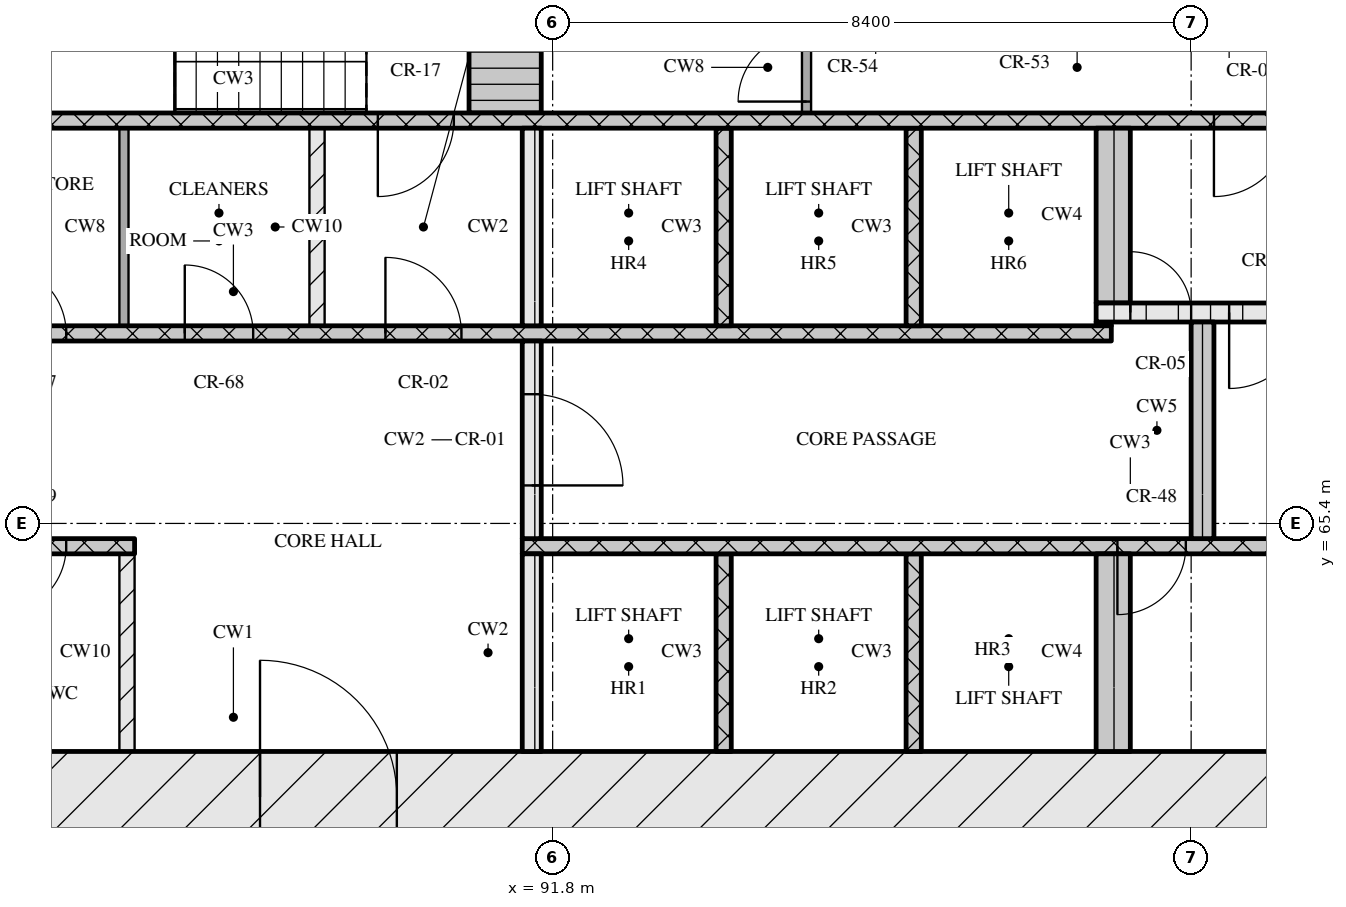
"""IFC4 building model, lengths in metres.
Left out: names, types, materials, properties, quantities, classifications, styles, units other than length and angle.
Written with IfcOpenShell. Run it as: python <this file> out.ifc"""

import sys

from ifc_helpers import new_model, si_unit, direction, frame, frame_2d, origin, place, context, subcontext, project, spatial, rectangle, extrude, element, fill, save


model = new_model("IFC4")
c1 = context("Model", 3, precision=1e-05, world=origin(), true_north=direction((0.0, 1.0)))
c2 = subcontext(c1, "Body", "Model", "MODEL_VIEW")
j1 = project(units=[si_unit("LENGTHUNIT", "METRE"), si_unit("PLANEANGLEUNIT", "RADIAN")], contexts=[c1])
p1 = place(None, origin())
s1 = spatial("IfcSite", under=j1, at=p1, CompositionType="ELEMENT")
p2 = place(p1, origin())
s2 = spatial("IfcBuilding", under=s1, at=p2, CompositionType="ELEMENT")
p3 = place(p2, frame((0.0, 0.0, 62.4)))
s3 = spatial("IfcBuildingStorey", under=s2, at=p3, CompositionType="ELEMENT", Elevation=62.4)
p4 = place(p3, frame((66.6, 61.8, 0.0), z_axis=(0.0, 0.0, 1.0), x_axis=(1.0, 0.0, 0.0)))
e1 = element("IfcWall", 1, at=p4, inside=s3, PredefinedType="SOLIDWALL", context=c2, shape_type="SweptSolid", body=[
    extrude(rectangle(XDim=42.0, YDim=1.2, at=frame_2d((21.0, 0.0))), origin(), (0.0, 0.0, 1.0), 3.32),
])
p5 = place(p4, frame((21.35, 0.0, 0.0)))
e2 = element("IfcOpeningElement", 2, at=p5, cuts=e1, PredefinedType="OPENING", context=c2, shape_type="SweptSolid", body=[
    extrude(rectangle(XDim=1.8, YDim=2.1, at=frame_2d((0.9, 1.05))), frame((0.0, 0.61, 0.0), z_axis=(0.0, -1.0, 0.0), x_axis=(1.0, 0.0, 0.0)), (0.0, 0.0, 1.0), 1.22),
])
p6 = place(p3, frame((86.2, 62.4, 0.0), z_axis=(0.0, 0.0, 1.0), x_axis=(0.0, 1.0, 0.0)))
e3 = element("IfcWall", 3, at=p6, inside=s3, PredefinedType="PARTITIONING", context=c2, shape_type="SweptSolid", body=[
    extrude(rectangle(XDim=2.6, YDim=0.2, at=frame_2d((1.3, 0.0))), origin(), (0.0, 0.0, 1.0), 3.32),
])
p7 = place(p3, frame((91.525, 62.4, 0.0), z_axis=(0.0, 0.0, 1.0), x_axis=(0.0, 1.0, 0.0)))
e4 = element("IfcWall", 4, at=p7, inside=s3, PredefinedType="SOLIDWALL", context=c2, shape_type="SweptSolid", body=[
    extrude(rectangle(XDim=2.6, YDim=0.25, at=frame_2d((1.3, 0.0))), origin(), (0.0, 0.0, 1.0), 3.32),
])
for number, where, z_axis, x_axis in (
    (5, (94.05, 62.4, 0.0), (0.0, 0.0, 1.0), (0.0, 1.0, 0.0)),
    (6, (96.55, 62.4, 0.0), (0.0, 0.0, 1.0), (0.0, 1.0, 0.0)),
):
    element("IfcWall", number, at=place(p3, frame(where, z_axis=z_axis, x_axis=x_axis)), inside=s3, PredefinedType="SOLIDWALL", context=c2, shape_type="SweptSolid", body=[
        extrude(rectangle(XDim=2.6, YDim=0.2, at=frame_2d((1.3, 0.0))), origin(), (0.0, 0.0, 1.0), 3.32),
    ])
p8 = place(p3, frame((99.175, 62.4, 0.0), z_axis=(0.0, 0.0, 1.0), x_axis=(0.0, 1.0, 0.0)))
e7 = element("IfcWall", 7, at=p8, inside=s3, PredefinedType="SOLIDWALL", context=c2, shape_type="SweptSolid", body=[
    extrude(rectangle(XDim=2.6, YDim=0.45, at=frame_2d((1.3, 0.0))), origin(), (0.0, 0.0, 1.0), 3.32),
])
p9 = place(p3, frame((67.8, 65.1, 0.0), z_axis=(0.0, 0.0, 1.0), x_axis=(1.0, 0.0, 0.0)))
e8 = element("IfcWall", 8, at=p9, inside=s3, PredefinedType="SOLIDWALL", context=c2, shape_type="SweptSolid", body=[
    extrude(rectangle(XDim=18.5, YDim=0.2, at=frame_2d((9.25, 0.0))), origin(), (0.0, 0.0, 1.0), 3.32),
])
p10 = place(p9, frame((7.27, 0.0, 0.0)))
e9 = element("IfcOpeningElement", 9, at=p10, cuts=e8, PredefinedType="OPENING", context=c2, shape_type="SweptSolid", body=[
    extrude(rectangle(XDim=0.9, YDim=2.1, at=frame_2d((0.45, 1.05))), frame((0.0, 0.11, 0.0), z_axis=(0.0, -1.0, 0.0), x_axis=(1.0, 0.0, 0.0)), (0.0, 0.0, 1.0), 0.22),
])
p11 = place(p9, frame((8.85, 0.0, 0.0)))
e10 = element("IfcOpeningElement", 10, at=p11, cuts=e8, PredefinedType="OPENING", context=c2, shape_type="SweptSolid", body=[
    extrude(rectangle(XDim=1.1, YDim=2.1, at=frame_2d((0.55, 1.05))), frame((0.0, 0.11, 0.0), z_axis=(0.0, -1.0, 0.0), x_axis=(1.0, 0.0, 0.0)), (0.0, 0.0, 1.0), 0.22),
])
p12 = place(p9, frame((11.35, 0.0, 0.0)))
e11 = element("IfcOpeningElement", 11, at=p12, cuts=e8, PredefinedType="OPENING", context=c2, shape_type="SweptSolid", body=[
    extrude(rectangle(XDim=1.1, YDim=2.1, at=frame_2d((0.55, 1.05))), frame((0.0, 0.11, 0.0), z_axis=(0.0, -1.0, 0.0), x_axis=(1.0, 0.0, 0.0)), (0.0, 0.0, 1.0), 0.22),
])
p13 = place(p9, frame((13.85, 0.0, 0.0)))
e12 = element("IfcOpeningElement", 12, at=p13, cuts=e8, PredefinedType="OPENING", context=c2, shape_type="SweptSolid", body=[
    extrude(rectangle(XDim=1.1, YDim=2.1, at=frame_2d((0.55, 1.05))), frame((0.0, 0.11, 0.0), z_axis=(0.0, -1.0, 0.0), x_axis=(1.0, 0.0, 0.0)), (0.0, 0.0, 1.0), 0.22),
])
p14 = place(p9, frame((16.7, 0.0, 0.0)))
e13 = element("IfcOpeningElement", 13, at=p14, cuts=e8, PredefinedType="OPENING", context=c2, shape_type="SweptSolid", body=[
    extrude(rectangle(XDim=0.9, YDim=2.1, at=frame_2d((0.45, 1.05))), frame((0.0, 0.11, 0.0), z_axis=(0.0, -1.0, 0.0), x_axis=(1.0, 0.0, 0.0)), (0.0, 0.0, 1.0), 0.22),
])
p15 = place(p3, frame((91.4, 65.1, 0.0), z_axis=(0.0, 0.0, 1.0), x_axis=(1.0, 0.0, 0.0)))
e14 = element("IfcWall", 14, at=p15, inside=s3, PredefinedType="SOLIDWALL", context=c2, shape_type="SweptSolid", body=[
    extrude(rectangle(XDim=16.0, YDim=0.2, at=frame_2d((8.0, 0.0))), origin(), (0.0, 0.0, 1.0), 3.32),
])
p16 = place(p15, frame((7.83, 0.0, 0.0)))
e15 = element("IfcOpeningElement", 15, at=p16, cuts=e14, PredefinedType="OPENING", context=c2, shape_type="SweptSolid", body=[
    extrude(rectangle(XDim=0.9, YDim=2.1, at=frame_2d((0.45, 1.05))), frame((0.0, 0.11, 0.0), z_axis=(0.0, -1.0, 0.0), x_axis=(1.0, 0.0, 0.0)), (0.0, 0.0, 1.0), 0.22),
])
p17 = place(p3, frame((91.525, 65.2, 0.0), z_axis=(0.0, 0.0, 1.0), x_axis=(0.0, 1.0, 0.0)))
e16 = element("IfcWall", 16, at=p17, inside=s3, PredefinedType="SOLIDWALL", context=c2, shape_type="SweptSolid", body=[
    extrude(rectangle(XDim=2.6, YDim=0.25, at=frame_2d((1.3, 0.0))), origin(), (0.0, 0.0, 1.0), 3.32),
])
p18 = place(p17, frame((0.7, 0.0, 0.0)))
e17 = element("IfcOpeningElement", 17, at=p18, cuts=e16, PredefinedType="OPENING", context=c2, shape_type="SweptSolid", body=[
    extrude(rectangle(XDim=1.2, YDim=2.1, at=frame_2d((0.6, 1.05))), frame((0.0, 0.135, 0.0), z_axis=(0.0, -1.0, 0.0), x_axis=(1.0, 0.0, 0.0)), (0.0, 0.0, 1.0), 0.27),
])
p19 = place(p3, frame((100.35, 65.2, 0.0), z_axis=(0.0, 0.0, 1.0), x_axis=(0.0, 1.0, 0.0)))
e18 = element("IfcWall", 18, at=p19, inside=s3, PredefinedType="SOLIDWALL", context=c2, shape_type="SweptSolid", body=[
    extrude(rectangle(XDim=2.85, YDim=0.3, at=frame_2d((1.425, 0.0))), origin(), (0.0, 0.0, 1.0), 3.32),
])
p20 = place(p3, frame((76.05, 67.9, 0.0), z_axis=(0.0, 0.0, 1.0), x_axis=(1.0, 0.0, 0.0)))
e19 = element("IfcWall", 19, at=p20, inside=s3, PredefinedType="SOLIDWALL", context=c2, shape_type="SweptSolid", body=[
    extrude(rectangle(XDim=23.1, YDim=0.2, at=frame_2d((11.55, 0.0))), origin(), (0.0, 0.0, 1.0), 3.32),
])
p21 = place(p20, frame((0.6, 0.0, 0.0)))
e20 = element("IfcOpeningElement", 20, at=p21, cuts=e19, PredefinedType="OPENING", context=c2, shape_type="SweptSolid", body=[
    extrude(rectangle(XDim=1.1, YDim=2.1, at=frame_2d((0.55, 1.05))), frame((0.0, 0.11, 0.0), z_axis=(0.0, -1.0, 0.0), x_axis=(1.0, 0.0, 0.0)), (0.0, 0.0, 1.0), 0.22),
])
p22 = place(p20, frame((3.1, 0.0, 0.0)))
e21 = element("IfcOpeningElement", 21, at=p22, cuts=e19, PredefinedType="OPENING", context=c2, shape_type="SweptSolid", body=[
    extrude(rectangle(XDim=1.1, YDim=2.1, at=frame_2d((0.55, 1.05))), frame((0.0, 0.11, 0.0), z_axis=(0.0, -1.0, 0.0), x_axis=(1.0, 0.0, 0.0)), (0.0, 0.0, 1.0), 0.22),
])
p23 = place(p20, frame((5.6, 0.0, 0.0)))
e22 = element("IfcOpeningElement", 22, at=p23, cuts=e19, PredefinedType="OPENING", context=c2, shape_type="SweptSolid", body=[
    extrude(rectangle(XDim=1.1, YDim=2.1, at=frame_2d((0.55, 1.05))), frame((0.0, 0.11, 0.0), z_axis=(0.0, -1.0, 0.0), x_axis=(1.0, 0.0, 0.0)), (0.0, 0.0, 1.0), 0.22),
])
p24 = place(p20, frame((8.45, 0.0, 0.0)))
e23 = element("IfcOpeningElement", 23, at=p24, cuts=e19, PredefinedType="OPENING", context=c2, shape_type="SweptSolid", body=[
    extrude(rectangle(XDim=0.9, YDim=2.1, at=frame_2d((0.45, 1.05))), frame((0.0, 0.11, 0.0), z_axis=(0.0, -1.0, 0.0), x_axis=(1.0, 0.0, 0.0)), (0.0, 0.0, 1.0), 0.22),
])
p25 = place(p20, frame((10.91, 0.0, 0.0)))
e24 = element("IfcOpeningElement", 24, at=p25, cuts=e19, PredefinedType="OPENING", context=c2, shape_type="SweptSolid", body=[
    extrude(rectangle(XDim=0.9, YDim=2.1, at=frame_2d((0.45, 1.05))), frame((0.0, 0.11, 0.0), z_axis=(0.0, -1.0, 0.0), x_axis=(1.0, 0.0, 0.0)), (0.0, 0.0, 1.0), 0.22),
])
p26 = place(p20, frame((13.55, 0.0, 0.0)))
e25 = element("IfcOpeningElement", 25, at=p26, cuts=e19, PredefinedType="OPENING", context=c2, shape_type="SweptSolid", body=[
    extrude(rectangle(XDim=1.0, YDim=2.1, at=frame_2d((0.5, 1.05))), frame((0.0, 0.11, 0.0), z_axis=(0.0, -1.0, 0.0), x_axis=(1.0, 0.0, 0.0)), (0.0, 0.0, 1.0), 0.22),
])
p27 = place(p3, frame((86.16, 68.0, 0.0), z_axis=(0.0, 0.0, 1.0), x_axis=(0.0, 1.0, 0.0)))
e26 = element("IfcWall", 26, at=p27, inside=s3, PredefinedType="PARTITIONING", context=c2, shape_type="SweptSolid", body=[
    extrude(rectangle(XDim=2.6, YDim=0.12, at=frame_2d((1.3, 0.0))), origin(), (0.0, 0.0, 1.0), 3.32),
])
p28 = place(p3, frame((88.7, 68.0, 0.0), z_axis=(0.0, 0.0, 1.0), x_axis=(0.0, 1.0, 0.0)))
e27 = element("IfcWall", 27, at=p28, inside=s3, PredefinedType="PARTITIONING", context=c2, shape_type="SweptSolid", body=[
    extrude(rectangle(XDim=2.6, YDim=0.2, at=frame_2d((1.3, 0.0))), origin(), (0.0, 0.0, 1.0), 3.32),
])
p29 = place(p3, frame((91.525, 68.0, 0.0), z_axis=(0.0, 0.0, 1.0), x_axis=(0.0, 1.0, 0.0)))
e28 = element("IfcWall", 28, at=p29, inside=s3, PredefinedType="SOLIDWALL", context=c2, shape_type="SweptSolid", body=[
    extrude(rectangle(XDim=2.6, YDim=0.25, at=frame_2d((1.3, 0.0))), origin(), (0.0, 0.0, 1.0), 3.32),
])
for number, where, z_axis, x_axis in (
    (29, (94.05, 68.0, 0.0), (0.0, 0.0, 1.0), (0.0, 1.0, 0.0)),
    (30, (96.55, 68.0, 0.0), (0.0, 0.0, 1.0), (0.0, 1.0, 0.0)),
):
    element("IfcWall", number, at=place(p3, frame(where, z_axis=z_axis, x_axis=x_axis)), inside=s3, PredefinedType="SOLIDWALL", context=c2, shape_type="SweptSolid", body=[
        extrude(rectangle(XDim=2.6, YDim=0.2, at=frame_2d((1.3, 0.0))), origin(), (0.0, 0.0, 1.0), 3.32),
    ])
p30 = place(p3, frame((98.95, 68.025, 0.0), z_axis=(0.0, 0.0, 1.0), x_axis=(1.0, 0.0, 0.0)))
e31 = element("IfcWall", 31, at=p30, inside=s3, PredefinedType="SOLIDWALL", context=c2, shape_type="SweptSolid", body=[
    extrude(rectangle(XDim=0.2, YDim=0.05, at=frame_2d((0.1, 0.0))), origin(), (0.0, 0.0, 1.0), 3.32),
])
p31 = place(p3, frame((98.95, 68.175, 0.0), z_axis=(0.0, 0.0, 1.0), x_axis=(1.0, 0.0, 0.0)))
e32 = element("IfcWall", 32, at=p31, inside=s3, PredefinedType="SOLIDWALL", context=c2, shape_type="SweptSolid", body=[
    extrude(rectangle(XDim=8.45, YDim=0.25, at=frame_2d((4.225, 0.0))), origin(), (0.0, 0.0, 1.0), 3.32),
])
p32 = place(p31, frame((0.45, 0.0, 0.0)))
e33 = element("IfcOpeningElement", 33, at=p32, cuts=e32, PredefinedType="OPENING", context=c2, shape_type="SweptSolid", body=[
    extrude(rectangle(XDim=0.8, YDim=2.1, at=frame_2d((0.4, 1.05))), frame((0.0, 0.135, 0.0), z_axis=(0.0, -1.0, 0.0), x_axis=(1.0, 0.0, 0.0)), (0.0, 0.0, 1.0), 0.27),
])
p33 = place(p31, frame((1.75, 0.0, 0.0)))
e34 = element("IfcOpeningElement", 34, at=p33, cuts=e32, PredefinedType="OPENING", context=c2, shape_type="SweptSolid", body=[
    extrude(rectangle(XDim=1.0, YDim=2.1, at=frame_2d((0.5, 1.05))), frame((0.0, 0.135, 0.0), z_axis=(0.0, -1.0, 0.0), x_axis=(1.0, 0.0, 0.0)), (0.0, 0.0, 1.0), 0.27),
])
p34 = place(p3, frame((99.175, 68.3, 0.0), z_axis=(0.0, 0.0, 1.0), x_axis=(0.0, 1.0, 0.0)))
e35 = element("IfcWall", 35, at=p34, inside=s3, PredefinedType="SOLIDWALL", context=c2, shape_type="SweptSolid", body=[
    extrude(rectangle(XDim=2.3, YDim=0.45, at=frame_2d((1.15, 0.0))), origin(), (0.0, 0.0, 1.0), 3.32),
])
p35 = place(p3, frame((67.8, 70.7, 0.0), z_axis=(0.0, 0.0, 1.0), x_axis=(1.0, 0.0, 0.0)))
e36 = element("IfcWall", 36, at=p35, inside=s3, PredefinedType="SOLIDWALL", context=c2, shape_type="SweptSolid", body=[
    extrude(rectangle(XDim=39.6, YDim=0.2, at=frame_2d((19.8, 0.0))), origin(), (0.0, 0.0, 1.0), 3.32),
])
p36 = place(p35, frame((0.65, 0.0, 0.0)))
e37 = element("IfcOpeningElement", 37, at=p36, cuts=e36, PredefinedType="OPENING", context=c2, shape_type="SweptSolid", body=[
    extrude(rectangle(XDim=1.1, YDim=2.1, at=frame_2d((0.55, 1.05))), frame((0.0, 0.11, 0.0), z_axis=(0.0, -1.0, 0.0), x_axis=(1.0, 0.0, 0.0)), (0.0, 0.0, 1.0), 0.22),
])
p37 = place(p35, frame((3.25, 0.0, 0.0)))
e38 = element("IfcOpeningElement", 38, at=p37, cuts=e36, PredefinedType="OPENING", context=c2, shape_type="SweptSolid", body=[
    extrude(rectangle(XDim=1.1, YDim=2.1, at=frame_2d((0.55, 1.05))), frame((0.0, 0.11, 0.0), z_axis=(0.0, -1.0, 0.0), x_axis=(1.0, 0.0, 0.0)), (0.0, 0.0, 1.0), 0.22),
])
p38 = place(p35, frame((5.9, 0.0, 0.0)))
e39 = element("IfcOpeningElement", 39, at=p38, cuts=e36, PredefinedType="OPENING", context=c2, shape_type="SweptSolid", body=[
    extrude(rectangle(XDim=1.0, YDim=2.1, at=frame_2d((0.5, 1.05))), frame((0.0, 0.11, 0.0), z_axis=(0.0, -1.0, 0.0), x_axis=(1.0, 0.0, 0.0)), (0.0, 0.0, 1.0), 0.22),
])
p39 = place(p35, frame((21.7, 0.0, 0.0)))
e40 = element("IfcOpeningElement", 40, at=p39, cuts=e36, PredefinedType="OPENING", context=c2, shape_type="SweptSolid", body=[
    extrude(rectangle(XDim=1.0, YDim=2.1, at=frame_2d((0.5, 1.05))), frame((0.0, 0.11, 0.0), z_axis=(0.0, -1.0, 0.0), x_axis=(1.0, 0.0, 0.0)), (0.0, 0.0, 1.0), 0.22),
])
p40 = place(p35, frame((32.7, 0.0, 0.0)))
e41 = element("IfcOpeningElement", 41, at=p40, cuts=e36, PredefinedType="OPENING", context=c2, shape_type="SweptSolid", body=[
    extrude(rectangle(XDim=1.0, YDim=2.1, at=frame_2d((0.5, 1.05))), frame((0.0, 0.11, 0.0), z_axis=(0.0, -1.0, 0.0), x_axis=(1.0, 0.0, 0.0)), (0.0, 0.0, 1.0), 0.22),
])
p41 = place(p35, frame((35.25, 0.0, 0.0)))
e42 = element("IfcOpeningElement", 42, at=p41, cuts=e36, PredefinedType="OPENING", context=c2, shape_type="SweptSolid", body=[
    extrude(rectangle(XDim=1.1, YDim=2.1, at=frame_2d((0.55, 1.05))), frame((0.0, 0.11, 0.0), z_axis=(0.0, -1.0, 0.0), x_axis=(1.0, 0.0, 0.0)), (0.0, 0.0, 1.0), 0.22),
])
p42 = place(p35, frame((37.85, 0.0, 0.0)))
e43 = element("IfcOpeningElement", 43, at=p42, cuts=e36, PredefinedType="OPENING", context=c2, shape_type="SweptSolid", body=[
    extrude(rectangle(XDim=1.1, YDim=2.1, at=frame_2d((0.55, 1.05))), frame((0.0, 0.11, 0.0), z_axis=(0.0, -1.0, 0.0), x_axis=(1.0, 0.0, 0.0)), (0.0, 0.0, 1.0), 0.22),
])
p43 = place(p3, frame((91.175, 70.8, 0.0), z_axis=(0.0, 0.0, 1.0), x_axis=(0.0, 1.0, 0.0)))
e44 = element("IfcWall", 44, at=p43, inside=s3, PredefinedType="SOLIDWALL", context=c2, shape_type="SweptSolid", body=[
    extrude(rectangle(XDim=2.95, YDim=0.95, at=frame_2d((1.475, 0.0))), origin(), (0.0, 0.0, 1.0), 3.32),
])
p44 = place(p3, frame((95.14, 70.8, 0.0), z_axis=(0.0, 0.0, 1.0), x_axis=(0.0, 1.0, 0.0)))
e45 = element("IfcWall", 45, at=p44, inside=s3, PredefinedType="PARTITIONING", context=c2, shape_type="SweptSolid", body=[
    extrude(rectangle(XDim=1.2, YDim=0.12, at=frame_2d((0.6, 0.0))), origin(), (0.0, 0.0, 1.0), 3.32),
])
p45 = place(p44, frame((0.15, 0.0, 0.0)))
e46 = element("IfcOpeningElement", 46, at=p45, cuts=e45, PredefinedType="OPENING", context=c2, shape_type="SweptSolid", body=[
    extrude(rectangle(XDim=0.9, YDim=2.1, at=frame_2d((0.45, 1.05))), frame((0.0, 0.07, 0.0), z_axis=(0.0, -1.0, 0.0), x_axis=(1.0, 0.0, 0.0)), (0.0, 0.0, 1.0), 0.14),
])
p46 = place(p5, origin())
e47 = element("IfcDoor", 47, at=p46, inside=s3, OperationType="DOUBLE_DOOR_SINGLE_SWING", PredefinedType="DOOR", context=c2, shape_type="SweptSolid", body=[
    extrude(rectangle(XDim=1.8, YDim=2.1, at=frame_2d((0.9, 1.05))), frame((0.0, 0.025, 0.0), z_axis=(0.0, -1.0, 0.0), x_axis=(1.0, 0.0, 0.0)), (0.0, 0.0, 1.0), 0.05),
])
fill(e2, e47)
p47 = place(p14, origin())
e48 = element("IfcDoor", 48, at=p47, inside=s3, OperationType="SINGLE_SWING_RIGHT", PredefinedType="DOOR", context=c2, shape_type="SweptSolid", body=[
    extrude(rectangle(XDim=0.9, YDim=2.1, at=frame_2d((0.45, 1.05))), frame((0.0, 0.025, 0.0), z_axis=(0.0, -1.0, 0.0), x_axis=(1.0, 0.0, 0.0)), (0.0, 0.0, 1.0), 0.05),
])
fill(e13, e48)
p48 = place(p16, origin())
e49 = element("IfcDoor", 49, at=p48, inside=s3, OperationType="SINGLE_SWING_RIGHT", PredefinedType="DOOR", context=c2, shape_type="SweptSolid", body=[
    extrude(rectangle(XDim=0.9, YDim=2.1, at=frame_2d((0.45, 1.05))), frame((0.0, 0.025, 0.0), z_axis=(0.0, -1.0, 0.0), x_axis=(1.0, 0.0, 0.0)), (0.0, 0.0, 1.0), 0.05),
])
fill(e15, e49)
p49 = place(p18, origin())
e50 = element("IfcDoor", 50, at=p49, inside=s3, OperationType="SINGLE_SWING_RIGHT", PredefinedType="DOOR", context=c2, shape_type="SweptSolid", body=[
    extrude(rectangle(XDim=1.2, YDim=2.1, at=frame_2d((0.6, 1.05))), frame((0.0, 0.025, 0.0), z_axis=(0.0, -1.0, 0.0), x_axis=(1.0, 0.0, 0.0)), (0.0, 0.0, 1.0), 0.05),
])
fill(e17, e50)
p50 = place(p24, origin())
e51 = element("IfcDoor", 51, at=p50, inside=s3, OperationType="SINGLE_SWING_LEFT", PredefinedType="DOOR", context=c2, shape_type="SweptSolid", body=[
    extrude(rectangle(XDim=0.9, YDim=2.1, at=frame_2d((0.45, 1.05))), frame((0.0, 0.025, 0.0), z_axis=(0.0, -1.0, 0.0), x_axis=(1.0, 0.0, 0.0)), (0.0, 0.0, 1.0), 0.05),
])
fill(e23, e51)
p51 = place(p25, origin())
e52 = element("IfcDoor", 52, at=p51, inside=s3, OperationType="SINGLE_SWING_LEFT", PredefinedType="DOOR", context=c2, shape_type="SweptSolid", body=[
    extrude(rectangle(XDim=0.9, YDim=2.1, at=frame_2d((0.45, 1.05))), frame((0.0, 0.025, 0.0), z_axis=(0.0, -1.0, 0.0), x_axis=(1.0, 0.0, 0.0)), (0.0, 0.0, 1.0), 0.05),
])
fill(e24, e52)
p52 = place(p26, origin())
e53 = element("IfcDoor", 53, at=p52, inside=s3, OperationType="SINGLE_SWING_LEFT", PredefinedType="DOOR", context=c2, shape_type="SweptSolid", body=[
    extrude(rectangle(XDim=1.0, YDim=2.1, at=frame_2d((0.5, 1.05))), frame((0.0, 0.025, 0.0), z_axis=(0.0, -1.0, 0.0), x_axis=(1.0, 0.0, 0.0)), (0.0, 0.0, 1.0), 0.05),
])
fill(e25, e53)
p53 = place(p32, origin())
e54 = element("IfcDoor", 54, at=p53, inside=s3, OperationType="SINGLE_SWING_LEFT", PredefinedType="DOOR", context=c2, shape_type="SweptSolid", body=[
    extrude(rectangle(XDim=0.8, YDim=2.1, at=frame_2d((0.4, 1.05))), frame((0.0, 0.025, 0.0), z_axis=(0.0, -1.0, 0.0), x_axis=(1.0, 0.0, 0.0)), (0.0, 0.0, 1.0), 0.05),
])
fill(e33, e54)
p54 = place(p33, origin())
e55 = element("IfcDoor", 55, at=p54, inside=s3, OperationType="SINGLE_SWING_RIGHT", PredefinedType="DOOR", context=c2, shape_type="SweptSolid", body=[
    extrude(rectangle(XDim=1.0, YDim=2.1, at=frame_2d((0.5, 1.05))), frame((0.0, 0.025, 0.0), z_axis=(0.0, -1.0, 0.0), x_axis=(1.0, 0.0, 0.0)), (0.0, 0.0, 1.0), 0.05),
])
fill(e34, e55)
p55 = place(p39, origin())
e56 = element("IfcDoor", 56, at=p55, inside=s3, OperationType="SINGLE_SWING_RIGHT", PredefinedType="DOOR", context=c2, shape_type="SweptSolid", body=[
    extrude(rectangle(XDim=1.0, YDim=2.1, at=frame_2d((0.5, 1.05))), frame((0.0, 0.025, 0.0), z_axis=(0.0, -1.0, 0.0), x_axis=(1.0, 0.0, 0.0)), (0.0, 0.0, 1.0), 0.05),
])
fill(e40, e56)
p56 = place(p40, origin())
e57 = element("IfcDoor", 57, at=p56, inside=s3, OperationType="SINGLE_SWING_RIGHT", PredefinedType="DOOR", context=c2, shape_type="SweptSolid", body=[
    extrude(rectangle(XDim=1.0, YDim=2.1, at=frame_2d((0.5, 1.05))), frame((0.0, 0.025, 0.0), z_axis=(0.0, -1.0, 0.0), x_axis=(1.0, 0.0, 0.0)), (0.0, 0.0, 1.0), 0.05),
])
fill(e41, e57)
p57 = place(p45, origin())
e58 = element("IfcDoor", 58, at=p57, inside=s3, OperationType="SINGLE_SWING_LEFT", PredefinedType="DOOR", context=c2, shape_type="SweptSolid", body=[
    extrude(rectangle(XDim=0.9, YDim=2.1, at=frame_2d((0.45, 1.05))), frame((0.0, 0.025, 0.0), z_axis=(0.0, -1.0, 0.0), x_axis=(1.0, 0.0, 0.0)), (0.0, 0.0, 1.0), 0.05),
])
fill(e46, e58)
save(model, sys.argv[1])
